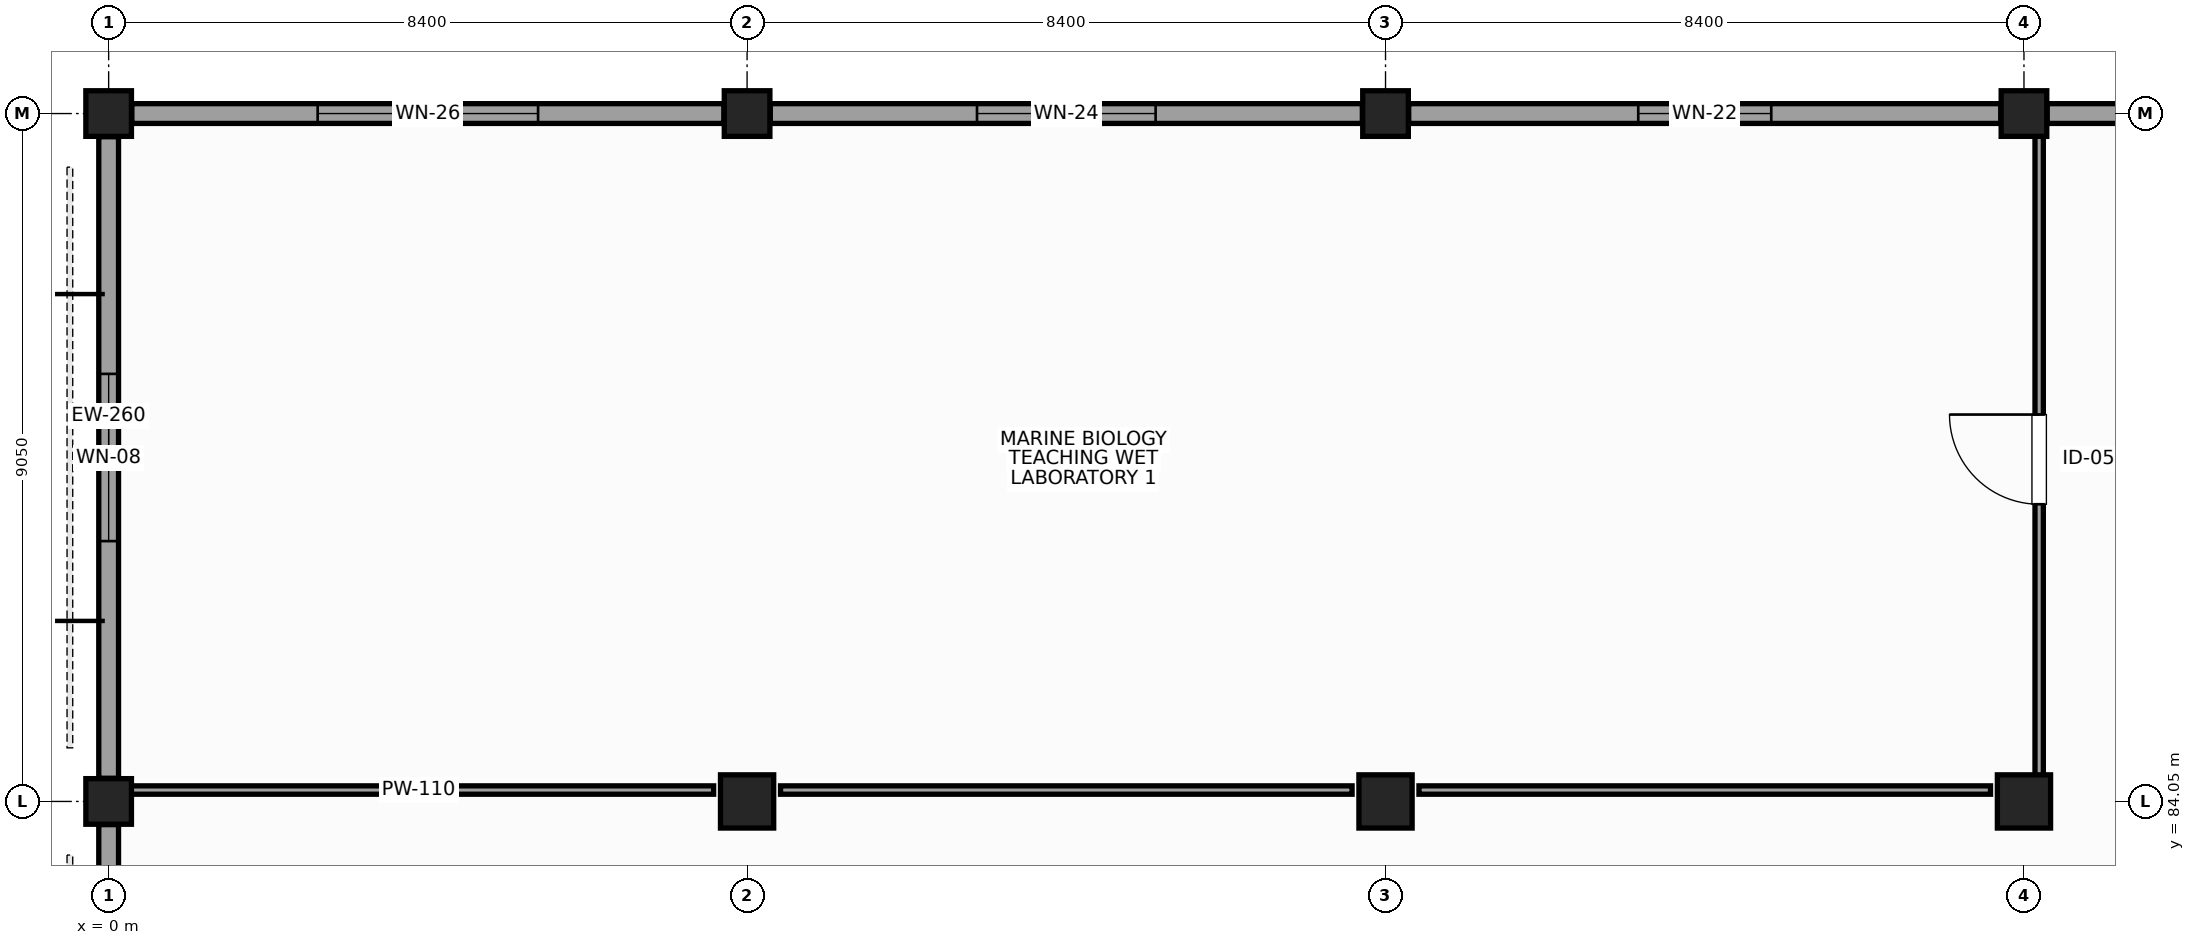
"""IFC4 building model, lengths in metres.
Left out: names, types, materials, properties, quantities, classifications, styles, units other than length and angle.
Written with IfcOpenShell. Run it as: python <this file> out.ifc"""

import sys

from ifc_helpers import new_model, si_unit, direction, frame, frame_2d, origin, origin_2d, place, context, subcontext, project, spatial, rectangle, extrude, element, fill, save


model = new_model("IFC4")
c1 = context("Model", 3, precision=1e-05, world=origin(), true_north=direction((0.0, 1.0)))
c2 = subcontext(c1, "Body", "Model", "MODEL_VIEW")
j1 = project(units=[si_unit("LENGTHUNIT", "METRE"), si_unit("PLANEANGLEUNIT", "RADIAN")], contexts=[c1])
p1 = place(None, origin())
s1 = spatial("IfcSite", under=j1, at=p1, CompositionType="ELEMENT")
p2 = place(p1, origin())
s2 = spatial("IfcBuilding", under=s1, at=p2, CompositionType="ELEMENT")
p3 = place(p2, frame((0.0, 0.0, 10.8)))
s3 = spatial("IfcBuildingStorey", under=s2, at=p3, CompositionType="ELEMENT", Elevation=10.8)
for number, where, z_axis, x_axis in (
    (1, (0.0, 84.05, 0.0), (0.0, 0.0, 1.0), (1.0, 0.0, 0.0)),
    (2, (0.0, 93.1, 0.0), (0.0, 0.0, 1.0), (1.0, 0.0, 0.0)),
):
    element("IfcColumn", number, at=place(p3, frame(where, z_axis=z_axis, x_axis=x_axis)), inside=s3, PredefinedType="COLUMN", context=c2, shape_type="SweptSolid", body=[
        extrude(rectangle(XDim=0.6, YDim=0.6, at=origin_2d()), origin(), (0.0, 0.0, 1.0), 4.8),
    ])
p4 = place(p3, frame((8.4, 84.05, 0.0), z_axis=(0.0, 0.0, 1.0), x_axis=(1.0, 0.0, 0.0)))
e3 = element("IfcColumn", 3, at=p4, inside=s3, PredefinedType="COLUMN", context=c2, shape_type="SweptSolid", body=[
    extrude(rectangle(XDim=0.7, YDim=0.7, at=origin_2d()), origin(), (0.0, 0.0, 1.0), 4.8),
])
p5 = place(p3, frame((8.4, 93.1, 0.0), z_axis=(0.0, 0.0, 1.0), x_axis=(1.0, 0.0, 0.0)))
e4 = element("IfcColumn", 4, at=p5, inside=s3, PredefinedType="COLUMN", context=c2, shape_type="SweptSolid", body=[
    extrude(rectangle(XDim=0.6, YDim=0.6, at=origin_2d()), origin(), (0.0, 0.0, 1.0), 4.8),
])
p6 = place(p3, frame((16.8, 84.05, 0.0), z_axis=(0.0, 0.0, 1.0), x_axis=(1.0, 0.0, 0.0)))
e5 = element("IfcColumn", 5, at=p6, inside=s3, PredefinedType="COLUMN", context=c2, shape_type="SweptSolid", body=[
    extrude(rectangle(XDim=0.7, YDim=0.7, at=origin_2d()), origin(), (0.0, 0.0, 1.0), 4.8),
])
p7 = place(p3, frame((16.8, 93.1, 0.0), z_axis=(0.0, 0.0, 1.0), x_axis=(1.0, 0.0, 0.0)))
e6 = element("IfcColumn", 6, at=p7, inside=s3, PredefinedType="COLUMN", context=c2, shape_type="SweptSolid", body=[
    extrude(rectangle(XDim=0.6, YDim=0.6, at=origin_2d()), origin(), (0.0, 0.0, 1.0), 4.8),
])
p8 = place(p3, frame((25.2, 84.05, 0.0), z_axis=(0.0, 0.0, 1.0), x_axis=(1.0, 0.0, 0.0)))
e7 = element("IfcColumn", 7, at=p8, inside=s3, PredefinedType="COLUMN", context=c2, shape_type="SweptSolid", body=[
    extrude(rectangle(XDim=0.7, YDim=0.7, at=origin_2d()), origin(), (0.0, 0.0, 1.0), 4.8),
])
p9 = place(p3, frame((25.2, 93.1, 0.0), z_axis=(0.0, 0.0, 1.0), x_axis=(1.0, 0.0, 0.0)))
e8 = element("IfcColumn", 8, at=p9, inside=s3, PredefinedType="COLUMN", context=c2, shape_type="SweptSolid", body=[
    extrude(rectangle(XDim=0.6, YDim=0.6, at=origin_2d()), origin(), (0.0, 0.0, 1.0), 4.8),
])
p10 = place(p3, frame((0.0, 92.795, 0.0), z_axis=(0.0, 0.0, 1.0), x_axis=(0.0, -1.0, 0.0)))
e9 = element("IfcWall", 9, at=p10, inside=s3, PredefinedType="STANDARD", context=c2, shape_type="SweptSolid", body=[
    extrude(rectangle(XDim=8.44, YDim=0.26, at=frame_2d((4.22, 0.0))), origin(), (0.0, 0.0, 1.0), 3.65),
])
p11 = place(p10, frame((3.12, 0.0, 0.95)))
e10 = element("IfcOpeningElement", 10, at=p11, cuts=e9, PredefinedType="OPENING", context=c2, shape_type="SweptSolid", body=[
    extrude(rectangle(XDim=2.2, YDim=1.9, at=frame_2d((1.1, 0.95))), frame((0.0, 0.14, 0.0), z_axis=(0.0, -1.0, 0.0), x_axis=(1.0, 0.0, 0.0)), (0.0, 0.0, 1.0), 0.28),
])
p12 = place(p3, frame((0.0, 83.745, 0.0), z_axis=(0.0, 0.0, 1.0), x_axis=(0.0, -1.0, 0.0)))
e11 = element("IfcWall", 11, at=p12, inside=s3, PredefinedType="STANDARD", context=c2, shape_type="SweptSolid", body=[
    extrude(rectangle(XDim=8.44, YDim=0.26, at=frame_2d((4.22, 0.0))), origin(), (0.0, 0.0, 1.0), 3.65),
])
p13 = place(p12, frame((3.52, 0.0, 0.95)))
e12 = element("IfcOpeningElement", 12, at=p13, cuts=e11, PredefinedType="OPENING", context=c2, shape_type="SweptSolid", body=[
    extrude(rectangle(XDim=1.4, YDim=1.6, at=frame_2d((0.7, 0.8))), frame((0.0, 0.14, 0.0), z_axis=(0.0, -1.0, 0.0), x_axis=(1.0, 0.0, 0.0)), (0.0, 0.0, 1.0), 0.28),
])
p14 = place(p3, frame((33.295, 93.1, 0.0), z_axis=(0.0, 0.0, 1.0), x_axis=(-1.0, 0.0, 0.0)))
e13 = element("IfcWall", 13, at=p14, inside=s3, PredefinedType="STANDARD", context=c2, shape_type="SweptSolid", body=[
    extrude(rectangle(XDim=7.79, YDim=0.26, at=frame_2d((3.895, 0.0))), origin(), (0.0, 0.0, 1.0), 3.63),
])
p15 = place(p14, frame((2.745, 0.0, 0.95)))
e14 = element("IfcOpeningElement", 14, at=p15, cuts=e13, PredefinedType="OPENING", context=c2, shape_type="SweptSolid", body=[
    extrude(rectangle(XDim=2.3, YDim=2.15, at=frame_2d((1.15, 1.075))), frame((0.0, 0.14, 0.0), z_axis=(0.0, -1.0, 0.0), x_axis=(1.0, 0.0, 0.0)), (0.0, 0.0, 1.0), 0.28),
])
p16 = place(p3, frame((24.895, 93.1, 0.0), z_axis=(0.0, 0.0, 1.0), x_axis=(-1.0, 0.0, 0.0)))
e15 = element("IfcWall", 15, at=p16, inside=s3, PredefinedType="STANDARD", context=c2, shape_type="SweptSolid", body=[
    extrude(rectangle(XDim=7.79, YDim=0.26, at=frame_2d((3.895, 0.0))), origin(), (0.0, 0.0, 1.0), 3.63),
])
p17 = place(p16, frame((3.02, 0.0, 0.95)))
e16 = element("IfcOpeningElement", 16, at=p17, cuts=e15, PredefinedType="OPENING", context=c2, shape_type="SweptSolid", body=[
    extrude(rectangle(XDim=1.75, YDim=1.95, at=frame_2d((0.875, 0.975))), frame((0.0, 0.14, 0.0), z_axis=(0.0, -1.0, 0.0), x_axis=(1.0, 0.0, 0.0)), (0.0, 0.0, 1.0), 0.28),
])
p18 = place(p3, frame((16.495, 93.1, 0.0), z_axis=(0.0, 0.0, 1.0), x_axis=(-1.0, 0.0, 0.0)))
e17 = element("IfcWall", 17, at=p18, inside=s3, PredefinedType="STANDARD", context=c2, shape_type="SweptSolid", body=[
    extrude(rectangle(XDim=7.79, YDim=0.26, at=frame_2d((3.895, 0.0))), origin(), (0.0, 0.0, 1.0), 3.63),
])
p19 = place(p18, frame((2.72, 0.0, 0.95)))
e18 = element("IfcOpeningElement", 18, at=p19, cuts=e17, PredefinedType="OPENING", context=c2, shape_type="SweptSolid", body=[
    extrude(rectangle(XDim=2.35, YDim=1.7, at=frame_2d((1.175, 0.85))), frame((0.0, 0.14, 0.0), z_axis=(0.0, -1.0, 0.0), x_axis=(1.0, 0.0, 0.0)), (0.0, 0.0, 1.0), 0.28),
])
p20 = place(p3, frame((8.095, 93.1, 0.0), z_axis=(0.0, 0.0, 1.0), x_axis=(-1.0, 0.0, 0.0)))
e19 = element("IfcWall", 19, at=p20, inside=s3, PredefinedType="STANDARD", context=c2, shape_type="SweptSolid", body=[
    extrude(rectangle(XDim=7.79, YDim=0.26, at=frame_2d((3.895, 0.0))), origin(), (0.0, 0.0, 1.0), 4.5),
])
p21 = place(p20, frame((2.445, 0.0, 0.95)))
e20 = element("IfcOpeningElement", 20, at=p21, cuts=e19, PredefinedType="OPENING", context=c2, shape_type="SweptSolid", body=[
    extrude(rectangle(XDim=2.9, YDim=1.9, at=frame_2d((1.45, 0.95))), frame((0.0, 0.14, 0.0), z_axis=(0.0, -1.0, 0.0), x_axis=(1.0, 0.0, 0.0)), (0.0, 0.0, 1.0), 0.28),
])
p22 = place(p3, frame((25.4, 84.255, 0.0), z_axis=(0.0, 0.0, 1.0), x_axis=(0.0, 1.0, 0.0)))
e21 = element("IfcWall", 21, at=p22, inside=s3, PredefinedType="PARTITIONING", context=c2, shape_type="SweptSolid", body=[
    extrude(rectangle(XDim=8.59, YDim=0.11, at=frame_2d((4.295, 0.0))), origin(), (0.0, 0.0, 1.0), 3.63),
])
p23 = place(p22, frame((3.705, 0.0, 0.0)))
e22 = element("IfcOpeningElement", 22, at=p23, cuts=e21, PredefinedType="OPENING", context=c2, shape_type="SweptSolid", body=[
    extrude(rectangle(XDim=1.18, YDim=2.2, at=frame_2d((0.59, 1.1))), frame((0.0, 0.065, 0.0), z_axis=(0.0, -1.0, 0.0), x_axis=(1.0, 0.0, 0.0)), (0.0, 0.0, 1.0), 0.13),
])
p24 = place(p3, frame((0.195, 84.2, 0.0), z_axis=(0.0, 0.0, 1.0), x_axis=(1.0, 0.0, 0.0)))
e23 = element("IfcWall", 23, at=p24, inside=s3, PredefinedType="PARTITIONING", context=c2, shape_type="SweptSolid", body=[
    extrude(rectangle(XDim=7.765, YDim=0.11, at=frame_2d((3.882, 0.0))), origin(), (0.0, 0.0, 1.0), 3.63),
])
for number, where, z_axis, x_axis in (
    (24, (8.84, 84.2, 0.0), (0.0, 0.0, 1.0), (1.0, 0.0, 0.0)),
    (25, (17.24, 84.2, 0.0), (0.0, 0.0, 1.0), (1.0, 0.0, 0.0)),
):
    element("IfcWall", number, at=place(p3, frame(where, z_axis=z_axis, x_axis=x_axis)), inside=s3, PredefinedType="PARTITIONING", context=c2, shape_type="SweptSolid", body=[
        extrude(rectangle(XDim=7.52, YDim=0.11, at=frame_2d((3.76, 0.0))), origin(), (0.0, 0.0, 1.0), 3.73),
    ])
p25 = place(p11, origin())
e26 = element("IfcWindow", 26, at=p25, inside=s3, PartitioningType="SINGLE_PANEL", PredefinedType="WINDOW", context=c2, shape_type="SweptSolid", body=[
    extrude(rectangle(XDim=2.2, YDim=1.9, at=frame_2d((1.1, 0.95))), frame((0.0, 0.03, 0.0), z_axis=(0.0, -1.0, 0.0), x_axis=(1.0, 0.0, 0.0)), (0.0, 0.0, 1.0), 0.06),
])
fill(e10, e26)
p26 = place(p17, origin())
e27 = element("IfcWindow", 27, at=p26, inside=s3, PartitioningType="SINGLE_PANEL", PredefinedType="WINDOW", context=c2, shape_type="SweptSolid", body=[
    extrude(rectangle(XDim=1.75, YDim=1.95, at=frame_2d((0.875, 0.975))), frame((0.0, 0.03, 0.0), z_axis=(0.0, -1.0, 0.0), x_axis=(1.0, 0.0, 0.0)), (0.0, 0.0, 1.0), 0.06),
])
fill(e16, e27)
p27 = place(p19, origin())
e28 = element("IfcWindow", 28, at=p27, inside=s3, PartitioningType="SINGLE_PANEL", PredefinedType="WINDOW", context=c2, shape_type="SweptSolid", body=[
    extrude(rectangle(XDim=2.35, YDim=1.7, at=frame_2d((1.175, 0.85))), frame((0.0, 0.03, 0.0), z_axis=(0.0, -1.0, 0.0), x_axis=(1.0, 0.0, 0.0)), (0.0, 0.0, 1.0), 0.06),
])
fill(e18, e28)
p28 = place(p21, origin())
e29 = element("IfcWindow", 29, at=p28, inside=s3, PartitioningType="SINGLE_PANEL", PredefinedType="WINDOW", context=c2, shape_type="SweptSolid", body=[
    extrude(rectangle(XDim=2.9, YDim=1.9, at=frame_2d((1.45, 0.95))), frame((0.0, 0.03, 0.0), z_axis=(0.0, -1.0, 0.0), x_axis=(1.0, 0.0, 0.0)), (0.0, 0.0, 1.0), 0.06),
])
fill(e20, e29)
p29 = place(p23, origin())
e30 = element("IfcDoor", 30, at=p29, inside=s3, OperationType="SINGLE_SWING_RIGHT", PredefinedType="DOOR", context=c2, shape_type="SweptSolid", body=[
    extrude(rectangle(XDim=1.18, YDim=2.2, at=frame_2d((0.59, 1.1))), frame((0.0, 0.025, 0.0), z_axis=(0.0, -1.0, 0.0), x_axis=(1.0, 0.0, 0.0)), (0.0, 0.0, 1.0), 0.05),
])
fill(e22, e30)
save(model, sys.argv[1])
